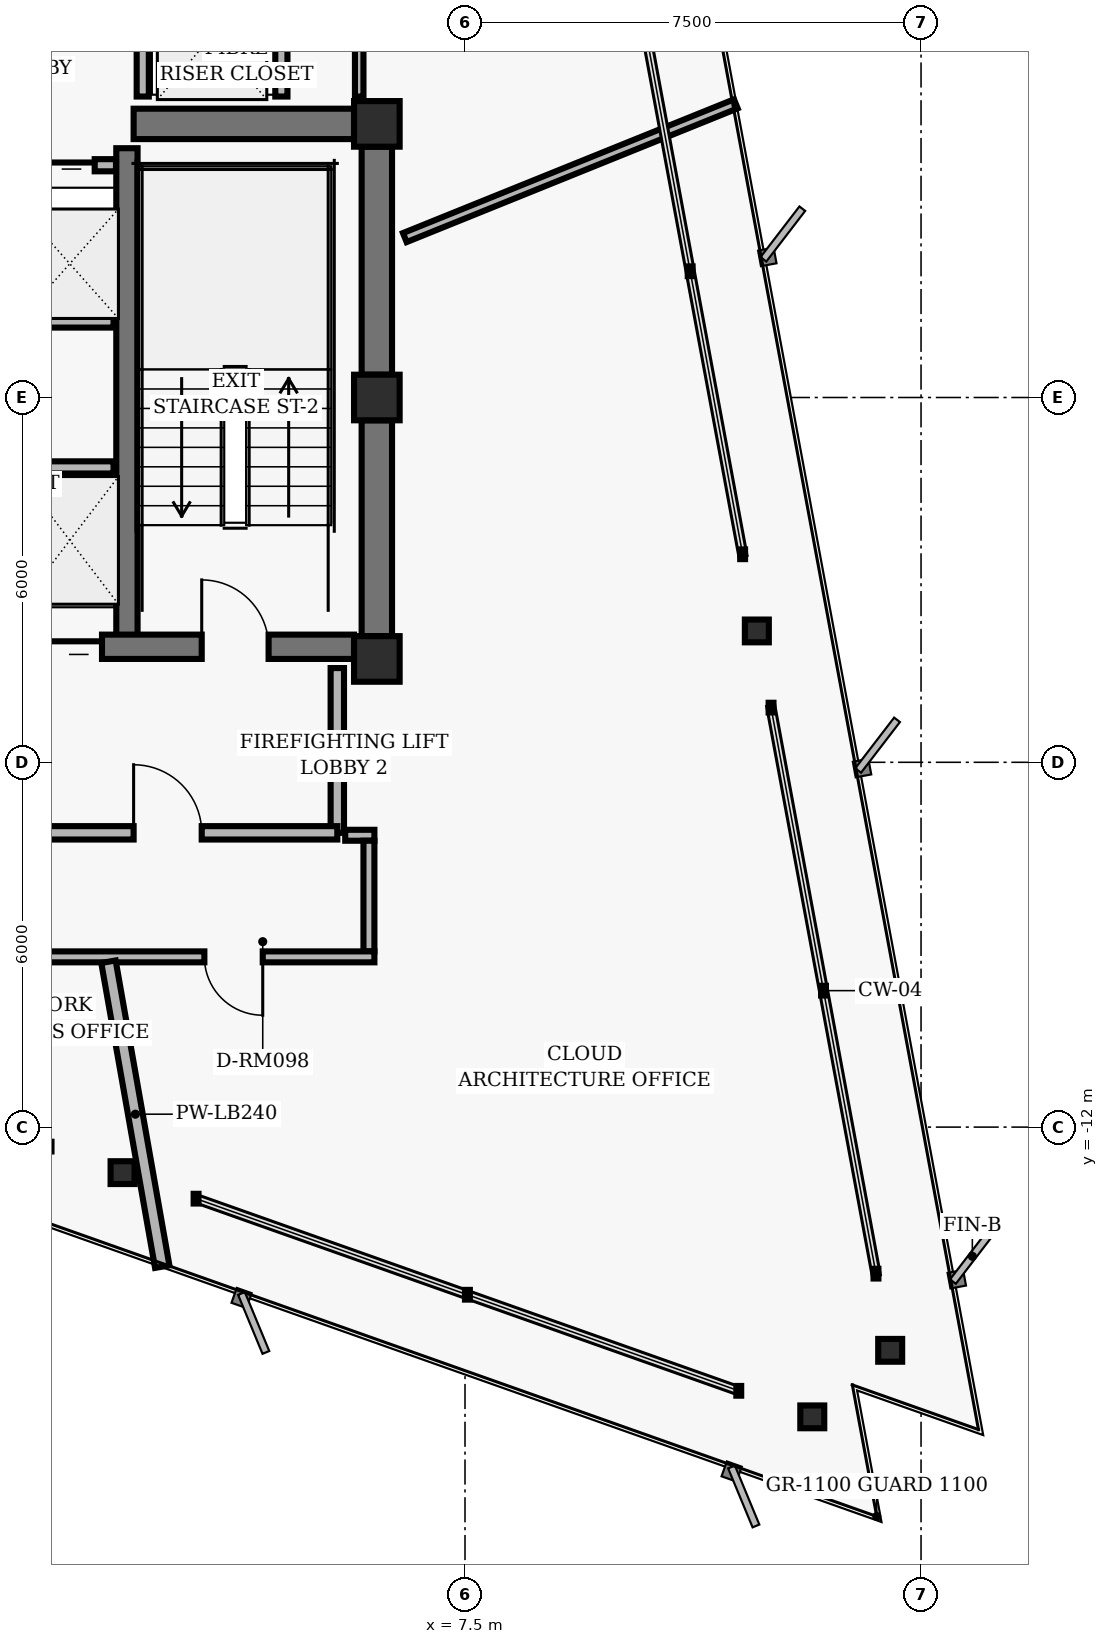
"""IFC4 building model, lengths in metres.
Left out: names, types, materials, properties, quantities, classifications, styles, units other than length and angle.
Written with IfcOpenShell. Run it as: python <this file> out.ifc"""

import sys

from ifc_helpers import new_model, si_unit, direction, frame, frame_2d, origin, origin_2d, place, context, subcontext, project, spatial, rectangle, hollow_rectangle, i_section, extrude, element, fill, save


model = new_model("IFC4")
c1 = context("Model", 3, precision=1e-05, world=origin(), true_north=direction((0.0, 1.0)))
c2 = subcontext(c1, "Body", "Model", "MODEL_VIEW")
j1 = project(units=[si_unit("LENGTHUNIT", "METRE"), si_unit("PLANEANGLEUNIT", "RADIAN")], contexts=[c1])
p1 = place(None, origin())
s1 = spatial("IfcSite", under=j1, at=p1, CompositionType="ELEMENT")
p2 = place(p1, origin())
s2 = spatial("IfcBuilding", under=s1, at=p2, CompositionType="ELEMENT")
p3 = place(p2, frame((0.0, 0.0, 187.52)))
s3 = spatial("IfcBuildingStorey", under=s2, at=p3, CompositionType="ELEMENT", Elevation=187.52)
for number, where, z_axis, x_axis in (
    (1, (6.05, 4.5, 0.0), (0.0, 0.0, 1.0), (1.0, 0.0, 0.0)),
    (2, (6.05, 0.0, 0.0), (0.0, 0.0, 1.0), (1.0, 0.0, 0.0)),
    (3, (6.05, -4.3, 0.0), (0.0, 0.0, 1.0), (1.0, 0.0, 0.0)),
):
    element("IfcColumn", number, at=place(p3, frame(where, z_axis=z_axis, x_axis=x_axis)), inside=s3, PredefinedType="COLUMN", context=c2, shape_type="SweptSolid", body=[
        extrude(hollow_rectangle(XDim=0.75, YDim=0.75, WallThickness=0.05, InnerFilletRadius=0.02, OuterFilletRadius=0.04, at=origin_2d()), origin(), (0.0, 0.0, 1.0), 3.04),
    ])
p4 = place(p3, frame((6.05, 0.375, 0.0), z_axis=(0.0, 0.0, 1.0), x_axis=(0.0, 1.0, 0.0)))
e4 = element("IfcWall", 4, at=p4, inside=s3, PredefinedType="SHEAR", context=c2, shape_type="SweptSolid", body=[
    extrude(rectangle(XDim=3.75, YDim=0.5, at=frame_2d((1.875, 0.0))), origin(), (0.0, 0.0, 1.0), 2.798),
])
p5 = place(p3, frame((6.05, -3.925, 0.0), z_axis=(0.0, 0.0, 1.0), x_axis=(0.0, 1.0, 0.0)))
e5 = element("IfcWall", 5, at=p5, inside=s3, PredefinedType="SHEAR", context=c2, shape_type="SweptSolid", body=[
    extrude(rectangle(XDim=3.55, YDim=0.5, at=frame_2d((1.775, 0.0))), origin(), (0.0, 0.0, 1.0), 2.798),
])
p6 = place(p3, frame((1.94, -4.1, 0.0), z_axis=(0.0, 0.0, 1.0), x_axis=(0.0, 1.0, 0.0)))
e6 = element("IfcWall", 6, at=p6, inside=s3, PredefinedType="SHEAR", context=c2, shape_type="SweptSolid", body=[
    extrude(rectangle(XDim=8.2, YDim=0.35, at=frame_2d((4.1, 0.0))), origin(), (0.0, 0.0, 1.0), 2.798),
])
p7 = place(p3, frame((-5.675, -4.1, 0.0), z_axis=(0.0, 0.0, 1.0), x_axis=(1.0, 0.0, 0.0)))
e7 = element("IfcWall", 7, at=p7, inside=s3, PredefinedType="SHEAR", context=c2, shape_type="SweptSolid", body=[
    extrude(rectangle(XDim=11.35, YDim=0.4, at=frame_2d((5.675, 0.0))), origin(), (0.0, 0.0, 1.0), 2.798),
])
p8 = place(p7, frame((1.405, 0.0, 0.0)))
e8 = element("IfcOpeningElement", 8, at=p8, cuts=e7, PredefinedType="OPENING", context=c2, shape_type="SweptSolid", body=[
    extrude(rectangle(XDim=1.1, YDim=2.04, at=frame_2d((0.55, 1.02))), frame((0.0, 0.21, 0.0), z_axis=(0.0, -1.0, 0.0), x_axis=(1.0, 0.0, 0.0)), (0.0, 0.0, 1.0), 0.42),
])
p9 = place(p7, frame((8.845, 0.0, 0.0)))
e9 = element("IfcOpeningElement", 9, at=p9, cuts=e7, PredefinedType="OPENING", context=c2, shape_type="SweptSolid", body=[
    extrude(rectangle(XDim=1.1, YDim=2.04, at=frame_2d((0.55, 1.02))), frame((0.0, 0.21, 0.0), z_axis=(0.0, -1.0, 0.0), x_axis=(1.0, 0.0, 0.0)), (0.0, 0.0, 1.0), 0.42),
])
p10 = place(p7, frame((4.145, 0.0, 0.0)))
e10 = element("IfcOpeningElement", 10, at=p10, cuts=e7, PredefinedType="OPENING", context=c2, shape_type="SweptSolid", body=[
    extrude(rectangle(XDim=1.06, YDim=2.04, at=frame_2d((0.53, 1.02))), frame((0.0, 0.21, 0.0), z_axis=(0.0, -1.0, 0.0), x_axis=(1.0, 0.0, 0.0)), (0.0, 0.0, 1.0), 0.42),
])
p11 = place(p7, frame((6.145, 0.0, 0.0)))
e11 = element("IfcOpeningElement", 11, at=p11, cuts=e7, PredefinedType="OPENING", context=c2, shape_type="SweptSolid", body=[
    extrude(rectangle(XDim=1.06, YDim=2.04, at=frame_2d((0.53, 1.02))), frame((0.0, 0.21, 0.0), z_axis=(0.0, -1.0, 0.0), x_axis=(1.0, 0.0, 0.0)), (0.0, 0.0, 1.0), 0.42),
])
p12 = place(p3, frame((2.05, 4.5, 0.0), z_axis=(0.0, 0.0, 1.0), x_axis=(1.0, 0.0, 0.0)))
e12 = element("IfcWall", 12, at=p12, inside=s3, PredefinedType="SHEAR", context=c2, shape_type="SweptSolid", body=[
    extrude(rectangle(XDim=3.625, YDim=0.5, at=frame_2d((1.812, 0.0))), origin(), (0.0, 0.0, 1.0), 2.798),
])
for number, where, z_axis, x_axis in (
    (13, (14.492, -15.671, 0.0), (0.0, 0.0, 1.0), (1.0, 0.0, 0.0)),
    (14, (12.3, -3.84, 0.0), (0.0, 0.0, 1.0), (1.0, 0.0, 0.0)),
    (15, (1.868, -12.749, 0.0), (0.0, 0.0, 1.0), (1.0, 0.0, 0.0)),
    (16, (13.211, -16.766, 0.0), (0.0, 0.0, 1.0), (1.0, 0.0, 0.0)),
):
    element("IfcColumn", number, at=place(p3, frame(where, z_axis=z_axis, x_axis=x_axis)), inside=s3, PredefinedType="COLUMN", context=c2, shape_type="SweptSolid", body=[
        extrude(i_section(OverallWidth=0.394, OverallDepth=0.375, WebThickness=0.017, FlangeThickness=0.028, FilletRadius=0.016, at=origin_2d()), origin(), (0.0, 0.0, 1.0), 3.04),
    ])
p13 = place(p3, frame((-1.72, -1.15, 0.0), z_axis=(0.0, 0.0, 1.0), x_axis=(1.0, 0.0, 0.0)))
e17 = element("IfcWall", 17, at=p13, inside=s3, PredefinedType="PARTITIONING", context=c2, shape_type="SweptSolid", body=[
    extrude(rectangle(XDim=3.44, YDim=0.2, at=frame_2d((1.72, 0.0))), origin(), (0.0, 0.0, 1.0), 2.773),
])
p14 = place(p3, frame((5.4, -7.16, 0.0), z_axis=(0.0, 0.0, 1.0), x_axis=(0.0, 1.0, 0.0)))
e18 = element("IfcWall", 18, at=p14, inside=s3, PredefinedType="PARTITIONING", context=c2, shape_type="SweptSolid", body=[
    extrude(rectangle(XDim=2.71, YDim=0.22, at=frame_2d((1.355, 0.0))), origin(), (0.0, 0.0, 1.0), 2.773),
])
p15 = place(p3, frame((0.0, -7.16, 0.0), z_axis=(0.0, 0.0, 1.0), x_axis=(1.0, 0.0, 0.0)))
e19 = element("IfcWall", 19, at=p15, inside=s3, PredefinedType="PARTITIONING", context=c2, shape_type="SweptSolid", body=[
    extrude(rectangle(XDim=5.4, YDim=0.22, at=frame_2d((2.7, 0.0))), origin(), (0.0, 0.0, 1.0), 2.395),
])
p16 = place(p15, frame((2.05, 0.0, 0.0)))
e20 = element("IfcOpeningElement", 20, at=p16, cuts=e19, PredefinedType="OPENING", context=c2, shape_type="SweptSolid", body=[
    extrude(rectangle(XDim=1.12, YDim=2.02, at=frame_2d((0.56, 1.01))), frame((0.0, 0.12, 0.0), z_axis=(0.0, -1.0, 0.0), x_axis=(1.0, 0.0, 0.0)), (0.0, 0.0, 1.0), 0.24),
])
p17 = place(p3, frame((-1.72, 1.25, 0.0), z_axis=(0.0, 0.0, 1.0), x_axis=(1.0, 0.0, 0.0)))
e21 = element("IfcWall", 21, at=p17, inside=s3, PredefinedType="PARTITIONING", context=c2, shape_type="SweptSolid", body=[
    extrude(rectangle(XDim=3.44, YDim=0.2, at=frame_2d((1.72, 0.0))), origin(), (0.0, 0.0, 1.0), 2.773),
])
p18 = place(p3, frame((-1.76, 3.82, 0.0), z_axis=(0.0, 0.0, 1.0), x_axis=(1.0, 0.0, 0.0)))
e22 = element("IfcWall", 22, at=p18, inside=s3, PredefinedType="PARTITIONING", context=c2, shape_type="SweptSolid", body=[
    extrude(rectangle(XDim=3.52, YDim=0.2, at=frame_2d((1.76, 0.0))), origin(), (0.0, 0.0, 1.0), 2.773),
])
p19 = place(p18, frame((0.35, 0.0, 0.0)))
e23 = element("IfcOpeningElement", 23, at=p19, cuts=e22, PredefinedType="OPENING", context=c2, shape_type="SweptSolid", body=[
    extrude(rectangle(XDim=1.06, YDim=2.04, at=frame_2d((0.53, 1.02))), frame((0.0, 0.11, 0.0), z_axis=(0.0, -1.0, 0.0), x_axis=(1.0, 0.0, 0.0)), (0.0, 0.0, 1.0), 0.22),
])
p20 = place(p18, frame((2.11, 0.0, 0.0)))
e24 = element("IfcOpeningElement", 24, at=p20, cuts=e22, PredefinedType="OPENING", context=c2, shape_type="SweptSolid", body=[
    extrude(rectangle(XDim=1.06, YDim=2.04, at=frame_2d((0.53, 1.02))), frame((0.0, 0.11, 0.0), z_axis=(0.0, -1.0, 0.0), x_axis=(1.0, 0.0, 0.0)), (0.0, 0.0, 1.0), 0.22),
])
for number, where, z_axis, x_axis in (
    (25, (2.2, 4.95, 0.0), (0.0, 0.0, 1.0), (0.0, 1.0, 0.0)),
    (26, (4.48, 4.95, 0.0), (0.0, 0.0, 1.0), (0.0, 1.0, 0.0)),
):
    element("IfcWall", number, at=place(p3, frame(where, z_axis=z_axis, x_axis=x_axis)), inside=s3, PredefinedType="PARTITIONING", context=c2, shape_type="SweptSolid", body=[
        extrude(rectangle(XDim=2.1, YDim=0.2, at=frame_2d((1.05, 0.0))), origin(), (0.0, 0.0, 1.0), 2.773),
    ])
p21 = place(p3, frame((5.76, 4.95, 0.0), z_axis=(0.0, 0.0, 1.0), x_axis=(0.0, 1.0, 0.0)))
e27 = element("IfcWall", 27, at=p21, inside=s3, PredefinedType="PARTITIONING", context=c2, shape_type="SweptSolid", body=[
    extrude(rectangle(XDim=2.1, YDim=0.14, at=frame_2d((1.05, 0.0))), origin(), (0.0, 0.0, 1.0), 2.253),
])
p22 = place(p3, frame((5.53, -7.2, 0.0), z_axis=(0.0, 0.0, 1.0), x_axis=(1.0, 0.0, 0.0)))
e28 = element("IfcWall", 28, at=p22, inside=s3, PredefinedType="PARTITIONING", context=c2, shape_type="SweptSolid", body=[
    extrude(rectangle(XDim=0.48, YDim=0.18, at=frame_2d((0.24, 0.0))), origin(), (0.0, 0.0, 1.0), 2.773),
])
p23 = place(p3, frame((5.92, -7.29, 0.0), z_axis=(0.0, 0.0, 1.0), x_axis=(0.0, -1.0, 0.0)))
e29 = element("IfcWall", 29, at=p23, inside=s3, PredefinedType="PARTITIONING", context=c2, shape_type="SweptSolid", body=[
    extrude(rectangle(XDim=1.82, YDim=0.18, at=frame_2d((0.91, 0.0))), origin(), (0.0, 0.0, 1.0), 2.773),
])
p24 = place(p3, frame((6.01, -9.2, 0.0), z_axis=(0.0, 0.0, 1.0), x_axis=(-1.0, 0.0, 0.0)))
e30 = element("IfcWall", 30, at=p24, inside=s3, PredefinedType="PARTITIONING", context=c2, shape_type="SweptSolid", body=[
    extrude(rectangle(XDim=13.3, YDim=0.18, at=frame_2d((6.65, 0.0))), origin(), (0.0, 0.0, 1.0), 2.395),
])
p25 = place(p24, frame((8.227, 0.0, 0.0)))
e31 = element("IfcOpeningElement", 31, at=p25, cuts=e30, PredefinedType="OPENING", context=c2, shape_type="SweptSolid", body=[
    extrude(rectangle(XDim=0.96, YDim=2.02, at=frame_2d((0.48, 1.01))), frame((0.0, 0.1, 0.0), z_axis=(0.0, -1.0, 0.0), x_axis=(1.0, 0.0, 0.0)), (0.0, 0.0, 1.0), 0.2),
])
p26 = place(p24, frame((1.836, 0.0, 0.0)))
e32 = element("IfcOpeningElement", 32, at=p26, cuts=e30, PredefinedType="OPENING", context=c2, shape_type="SweptSolid", body=[
    extrude(rectangle(XDim=0.96, YDim=2.02, at=frame_2d((0.48, 1.01))), frame((0.0, 0.1, 0.0), z_axis=(0.0, -1.0, 0.0), x_axis=(1.0, 0.0, 0.0)), (0.0, 0.0, 1.0), 0.2),
])
p27 = place(p3, frame((1.636, -9.28, 0.0), z_axis=(0.0, 0.0, 1.0), x_axis=(0.173634919368, -0.984810090716, 0.0)))
e33 = element("IfcWall", 33, at=p27, inside=s3, PredefinedType="PARTITIONING", context=c2, shape_type="SweptSolid", body=[
    extrude(rectangle(XDim=5.093, YDim=0.24, at=frame_2d((2.546, 0.0))), origin(), (0.0, 0.0, 1.0), 2.773),
])
p28 = place(p3, frame((6.51, 2.63, 0.0), z_axis=(0.0, 0.0, 1.0), x_axis=(0.927189354085, 0.374592981342, 0.0)))
e34 = element("IfcWall", 34, at=p28, inside=s3, PredefinedType="PARTITIONING", context=c2, shape_type="SweptSolid", body=[
    extrude(rectangle(XDim=5.872, YDim=0.16, at=frame_2d((2.936, 0.0))), origin(), (0.0, 0.0, 1.0), 2.773),
])
p29 = place(p9, origin())
e35 = element("IfcDoor", 35, at=p29, inside=s3, OperationType="SINGLE_SWING_LEFT", PredefinedType="DOOR", context=c2, shape_type="SweptSolid", body=[
    extrude(rectangle(XDim=1.1, YDim=2.04, at=frame_2d((0.55, 1.02))), frame((0.0, 0.025, 0.0), z_axis=(0.0, -1.0, 0.0), x_axis=(1.0, 0.0, 0.0)), (0.0, 0.0, 1.0), 0.05),
])
fill(e9, e35)
p30 = place(p11, origin())
e36 = element("IfcDoor", 36, at=p30, inside=s3, OperationType="SLIDING_TO_RIGHT", PredefinedType="DOOR", context=c2, shape_type="SweptSolid", body=[
    extrude(rectangle(XDim=1.06, YDim=2.04, at=frame_2d((0.53, 1.02))), frame((0.0, 0.025, 0.0), z_axis=(0.0, -1.0, 0.0), x_axis=(1.0, 0.0, 0.0)), (0.0, 0.0, 1.0), 0.05),
])
fill(e11, e36)
p31 = place(p16, origin())
e37 = element("IfcDoor", 37, at=p31, inside=s3, OperationType="SINGLE_SWING_LEFT", PredefinedType="DOOR", context=c2, shape_type="SweptSolid", body=[
    extrude(rectangle(XDim=1.12, YDim=2.02, at=frame_2d((0.56, 1.01))), frame((0.0, 0.025, 0.0), z_axis=(0.0, -1.0, 0.0), x_axis=(1.0, 0.0, 0.0)), (0.0, 0.0, 1.0), 0.05),
])
fill(e20, e37)
p32 = place(p20, origin())
e38 = element("IfcDoor", 38, at=p32, inside=s3, OperationType="SLIDING_TO_RIGHT", PredefinedType="DOOR", context=c2, shape_type="SweptSolid", body=[
    extrude(rectangle(XDim=1.06, YDim=2.04, at=frame_2d((0.53, 1.02))), frame((0.0, 0.025, 0.0), z_axis=(0.0, -1.0, 0.0), x_axis=(1.0, 0.0, 0.0)), (0.0, 0.0, 1.0), 0.05),
])
fill(e24, e38)
p33 = place(p26, origin())
e39 = element("IfcDoor", 39, at=p33, inside=s3, OperationType="SINGLE_SWING_LEFT", PredefinedType="DOOR", context=c2, shape_type="SweptSolid", body=[
    extrude(rectangle(XDim=0.96, YDim=2.02, at=frame_2d((0.48, 1.01))), frame((0.0, 0.025, 0.0), z_axis=(0.0, -1.0, 0.0), x_axis=(1.0, 0.0, 0.0)), (0.0, 0.0, 1.0), 0.05),
])
fill(e32, e39)
save(model, sys.argv[1])
